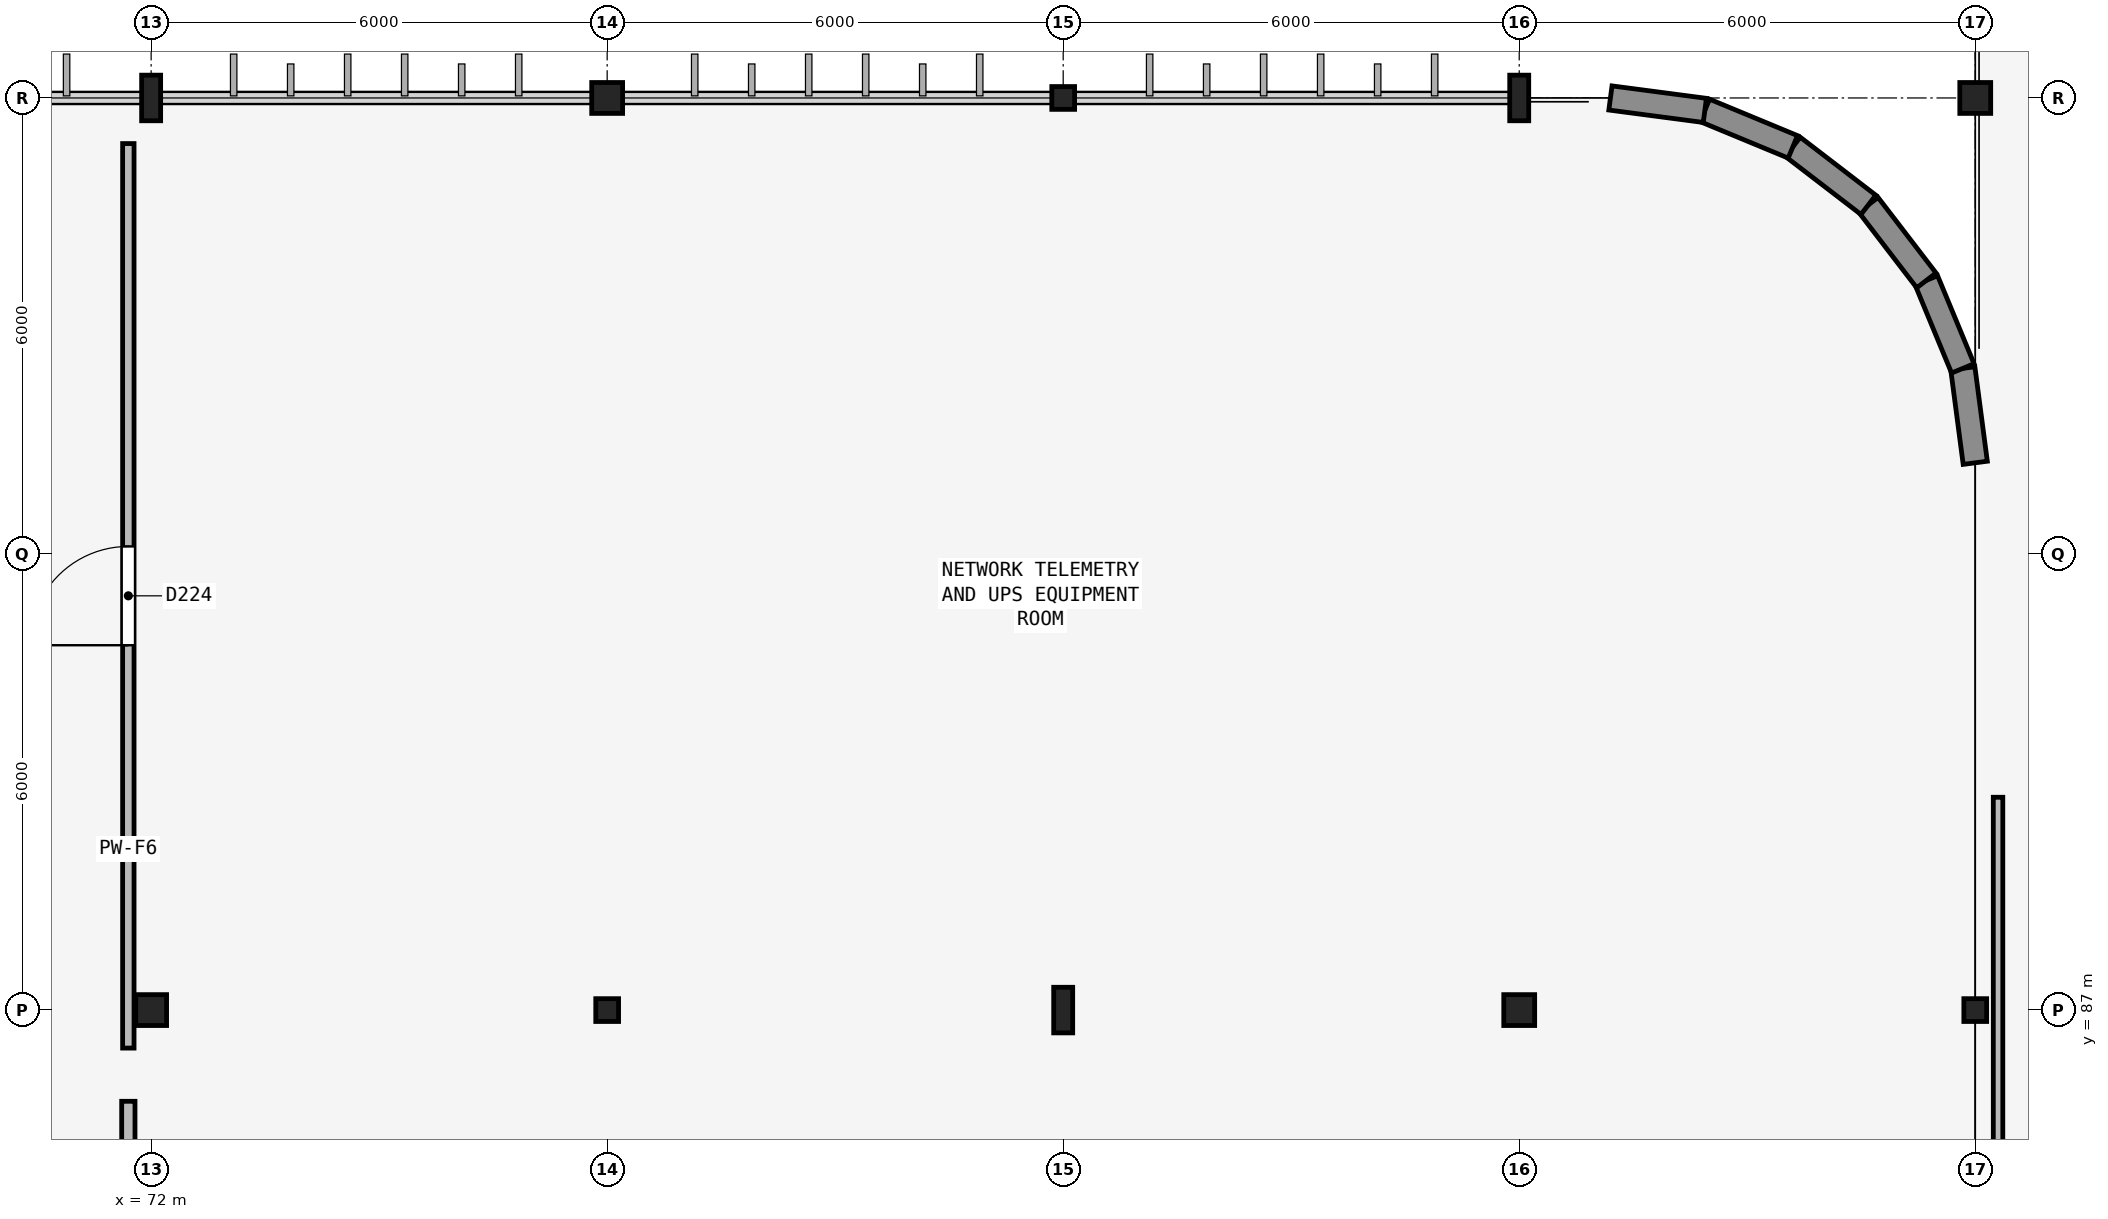
"""IFC4 building model, lengths in metres.
Left out: names, types, materials, properties, quantities, classifications, styles, units other than length and angle.
Written with IfcOpenShell. Run it as: python <this file> out.ifc"""

import sys

from ifc_helpers import new_model, si_unit, direction, frame, frame_2d, origin, origin_2d, place, context, subcontext, project, spatial, rectangle, hollow_rectangle, hollow_circle, i_section, extrude, element, fill, save


model = new_model("IFC4")
c1 = context("Model", 3, precision=1e-05, world=origin(), true_north=direction((0.0, 1.0)))
c2 = subcontext(c1, "Body", "Model", "MODEL_VIEW")
j1 = project(units=[si_unit("LENGTHUNIT", "METRE"), si_unit("PLANEANGLEUNIT", "RADIAN")], contexts=[c1])
p1 = place(None, origin())
s1 = spatial("IfcSite", under=j1, at=p1, CompositionType="ELEMENT")
p2 = place(p1, origin())
s2 = spatial("IfcBuilding", under=s1, at=p2, CompositionType="ELEMENT")
p3 = place(p2, frame((0.0, 0.0, 9.3)))
s3 = spatial("IfcBuildingStorey", under=s2, at=p3, CompositionType="ELEMENT", Elevation=9.3)
p4 = place(p3, frame((72.0, 87.0, 0.0), z_axis=(0.0, 0.0, 1.0), x_axis=(1.0, 0.0, 0.0)))
e1 = element("IfcColumn", 1, at=p4, inside=s3, PredefinedType="COLUMN", context=c2, shape_type="SweptSolid", body=[
    extrude(hollow_circle(Radius=0.203, WallThickness=0.016, at=origin_2d()), origin(), (0.0, 0.0, 1.0), 4.2),
])
p5 = place(p3, frame((72.0, 99.0, 0.0), z_axis=(0.0, 0.0, 1.0), x_axis=(1.0, 0.0, 0.0)))
e2 = element("IfcColumn", 2, at=p5, inside=s3, PredefinedType="COLUMN", context=c2, shape_type="SweptSolid", body=[
    extrude(i_section(OverallWidth=0.25, OverallDepth=0.6, WebThickness=0.012, FlangeThickness=0.024, FilletRadius=0.017, at=origin_2d()), origin(), (0.0, 0.0, 1.0), 4.2),
])
p6 = place(p3, frame((78.0, 87.0, 0.0), z_axis=(0.0, 0.0, 1.0), x_axis=(1.0, 0.0, 0.0)))
e3 = element("IfcColumn", 3, at=p6, inside=s3, PredefinedType="COLUMN", context=c2, shape_type="SweptSolid", body=[
    extrude(hollow_rectangle(XDim=0.3, YDim=0.3, WallThickness=0.016, InnerFilletRadius=0.016, OuterFilletRadius=0.032, at=origin_2d()), origin(), (0.0, 0.0, 1.0), 4.2),
])
p7 = place(p3, frame((78.0, 99.0, 0.0), z_axis=(0.0, 0.0, 1.0), x_axis=(1.0, 0.0, 0.0)))
e4 = element("IfcColumn", 4, at=p7, inside=s3, PredefinedType="COLUMN", context=c2, shape_type="SweptSolid", body=[
    extrude(hollow_circle(Radius=0.203, WallThickness=0.016, at=origin_2d()), origin(), (0.0, 0.0, 1.0), 4.2),
])
p8 = place(p3, frame((84.0, 87.0, 0.0), z_axis=(0.0, 0.0, 1.0), x_axis=(1.0, 0.0, 0.0)))
e5 = element("IfcColumn", 5, at=p8, inside=s3, PredefinedType="COLUMN", context=c2, shape_type="SweptSolid", body=[
    extrude(i_section(OverallWidth=0.25, OverallDepth=0.6, WebThickness=0.012, FlangeThickness=0.024, FilletRadius=0.017, at=origin_2d()), origin(), (0.0, 0.0, 1.0), 4.2),
])
p9 = place(p3, frame((84.0, 99.0, 0.0), z_axis=(0.0, 0.0, 1.0), x_axis=(1.0, 0.0, 0.0)))
e6 = element("IfcColumn", 6, at=p9, inside=s3, PredefinedType="COLUMN", context=c2, shape_type="SweptSolid", body=[
    extrude(hollow_rectangle(XDim=0.3, YDim=0.3, WallThickness=0.016, InnerFilletRadius=0.016, OuterFilletRadius=0.032, at=origin_2d()), origin(), (0.0, 0.0, 1.0), 4.2),
])
p10 = place(p3, frame((90.0, 87.0, 0.0), z_axis=(0.0, 0.0, 1.0), x_axis=(1.0, 0.0, 0.0)))
e7 = element("IfcColumn", 7, at=p10, inside=s3, PredefinedType="COLUMN", context=c2, shape_type="SweptSolid", body=[
    extrude(hollow_circle(Radius=0.203, WallThickness=0.016, at=origin_2d()), origin(), (0.0, 0.0, 1.0), 4.2),
])
p11 = place(p3, frame((90.0, 99.0, 0.0), z_axis=(0.0, 0.0, 1.0), x_axis=(1.0, 0.0, 0.0)))
e8 = element("IfcColumn", 8, at=p11, inside=s3, PredefinedType="COLUMN", context=c2, shape_type="SweptSolid", body=[
    extrude(i_section(OverallWidth=0.25, OverallDepth=0.6, WebThickness=0.012, FlangeThickness=0.024, FilletRadius=0.017, at=origin_2d()), origin(), (0.0, 0.0, 1.0), 4.2),
])
p12 = place(p3, frame((96.0, 87.0, 0.0), z_axis=(0.0, 0.0, 1.0), x_axis=(1.0, 0.0, 0.0)))
e9 = element("IfcColumn", 9, at=p12, inside=s3, PredefinedType="COLUMN", context=c2, shape_type="SweptSolid", body=[
    extrude(hollow_rectangle(XDim=0.3, YDim=0.3, WallThickness=0.016, InnerFilletRadius=0.016, OuterFilletRadius=0.032, at=origin_2d()), origin(), (0.0, 0.0, 1.0), 4.2),
])
p13 = place(p3, frame((96.0, 99.0, 0.0), z_axis=(0.0, 0.0, 1.0), x_axis=(1.0, 0.0, 0.0)))
e10 = element("IfcColumn", 10, at=p13, inside=s3, PredefinedType="COLUMN", context=c2, shape_type="SweptSolid", body=[
    extrude(hollow_circle(Radius=0.203, WallThickness=0.016, at=origin_2d()), origin(), (0.0, 0.0, 1.0), 4.2),
])
for number, where, z_axis, x_axis in (
    (11, (96.0, 94.2, 0.0), (0.0, 0.0, 1.0), (-0.131, 0.991, 0.0)),
    (12, (95.836, 95.442, 0.0), (0.0, 0.0, 1.0), (-0.383, 0.924, 0.0)),
):
    element("IfcWall", number, at=place(p3, frame(where, z_axis=z_axis, x_axis=x_axis)), inside=s3, PredefinedType="SOLIDWALL", context=c2, shape_type="SweptSolid", body=[
        extrude(rectangle(XDim=1.253, YDim=0.32, at=frame_2d((0.626, 0.0))), origin(), (0.0, 0.0, 1.0), 3.09),
    ])
for number, where, z_axis, x_axis in (
    (13, (95.357, 96.6, 0.0), (0.0, 0.0, 1.0), (-0.609, 0.793, 0.0)),
    (14, (94.594, 97.594, 0.0), (0.0, 0.0, 1.0), (-0.793, 0.609, 0.0)),
):
    element("IfcWall", number, at=place(p3, frame(where, z_axis=z_axis, x_axis=x_axis)), inside=s3, PredefinedType="SOLIDWALL", context=c2, shape_type="SweptSolid", body=[
        extrude(rectangle(XDim=1.253, YDim=0.32, at=frame_2d((0.626, 0.0))), origin(), (0.0, 0.0, 1.0), 3.895),
    ])
for number, where, z_axis, x_axis in (
    (15, (93.6, 98.357, 0.0), (0.0, 0.0, 1.0), (-0.924, 0.383, 0.0)),
    (16, (92.442, 98.836, 0.0), (0.0, 0.0, 1.0), (-0.991, 0.131, 0.0)),
):
    element("IfcWall", number, at=place(p3, frame(where, z_axis=z_axis, x_axis=x_axis)), inside=s3, PredefinedType="SOLIDWALL", context=c2, shape_type="SweptSolid", body=[
        extrude(rectangle(XDim=1.253, YDim=0.32, at=frame_2d((0.626, 0.0))), origin(), (0.0, 0.0, 1.0), 3.54),
    ])
p14 = place(p3, frame((71.7, 69.5, 0.0), z_axis=(0.0, 0.0, 1.0), x_axis=(0.0, 1.0, 0.0)))
e17 = element("IfcWall", 17, at=p14, inside=s3, PredefinedType="PARTITIONING", context=c2, shape_type="SweptSolid", body=[
    extrude(rectangle(XDim=16.3, YDim=0.175, at=frame_2d((8.15, 0.0))), origin(), (0.0, 0.0, 1.0), 3.09),
])
p15 = place(p14, frame((7.55, 0.0, 0.0)))
e18 = element("IfcOpeningElement", 18, at=p15, cuts=e17, PredefinedType="OPENING", context=c2, shape_type="SweptSolid", body=[
    extrude(rectangle(XDim=1.2, YDim=2.15, at=frame_2d((0.6, 1.075))), frame((0.0, 0.097, 0.0), z_axis=(0.0, -1.0, 0.0), x_axis=(1.0, 0.0, 0.0)), (0.0, 0.0, 1.0), 0.195),
])
p16 = place(p3, frame((71.7, 86.5, 0.0), z_axis=(0.0, 0.0, 1.0), x_axis=(0.0, 1.0, 0.0)))
e19 = element("IfcWall", 19, at=p16, inside=s3, PredefinedType="PARTITIONING", context=c2, shape_type="SweptSolid", body=[
    extrude(rectangle(XDim=11.9, YDim=0.15, at=frame_2d((5.95, 0.0))), origin(), (0.0, 0.0, 1.0), 3.29),
])
p17 = place(p16, frame((5.3, 0.0, 0.0)))
e20 = element("IfcOpeningElement", 20, at=p17, cuts=e19, PredefinedType="OPENING", context=c2, shape_type="SweptSolid", body=[
    extrude(rectangle(XDim=1.3, YDim=2.2, at=frame_2d((0.65, 1.1))), frame((0.0, 0.085, 0.0), z_axis=(0.0, -1.0, 0.0), x_axis=(1.0, 0.0, 0.0)), (0.0, 0.0, 1.0), 0.17),
])
p18 = place(p3, frame((96.3, 69.5, 0.0), z_axis=(0.0, 0.0, 1.0), x_axis=(0.0, 1.0, 0.0)))
e21 = element("IfcWall", 21, at=p18, inside=s3, PredefinedType="PARTITIONING", context=c2, shape_type="SweptSolid", body=[
    extrude(rectangle(XDim=20.3, YDim=0.125, at=frame_2d((10.15, 0.0))), origin(), (0.0, 0.0, 1.0), 3.09),
])
p19 = place(p18, frame((9.375, 0.0, 0.0)))
e22 = element("IfcOpeningElement", 22, at=p19, cuts=e21, PredefinedType="OPENING", context=c2, shape_type="SweptSolid", body=[
    extrude(rectangle(XDim=1.55, YDim=2.2, at=frame_2d((0.775, 1.1))), frame((0.0, 0.073, 0.0), z_axis=(0.0, -1.0, 0.0), x_axis=(1.0, 0.0, 0.0)), (0.0, 0.0, 1.0), 0.145),
])
p20 = place(p17, origin())
e23 = element("IfcDoor", 23, at=p20, inside=s3, OperationType="SINGLE_SWING_LEFT", PredefinedType="DOOR", context=c2, shape_type="SweptSolid", body=[
    extrude(rectangle(XDim=1.3, YDim=2.2, at=frame_2d((0.65, 1.1))), frame((0.0, 0.025, 0.0), z_axis=(0.0, -1.0, 0.0), x_axis=(1.0, 0.0, 0.0)), (0.0, 0.0, 1.0), 0.05),
])
fill(e20, e23)
save(model, sys.argv[1])
